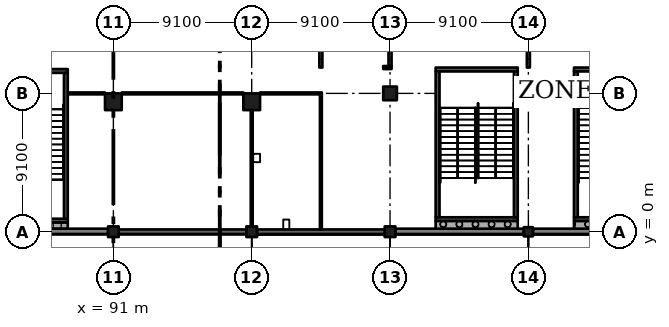
"""IFC4 building model, lengths in metres.
Left out: names, types, materials, properties, quantities, classifications, styles, units other than length and angle.
Written with IfcOpenShell. Run it as: python <this file> out.ifc"""

import sys

from ifc_helpers import new_model, si_unit, direction, frame, frame_2d, origin, origin_2d, place, context, subcontext, project, spatial, rectangle, extrude, element, fill, save


model = new_model("IFC4")
c1 = context("Model", 3, precision=1e-05, world=origin(), true_north=direction((0.0, 1.0)))
c2 = subcontext(c1, "Body", "Model", "MODEL_VIEW")
j1 = project(units=[si_unit("LENGTHUNIT", "METRE"), si_unit("PLANEANGLEUNIT", "RADIAN")], contexts=[c1])
p1 = place(None, origin())
s1 = spatial("IfcSite", under=j1, at=p1, CompositionType="ELEMENT")
p2 = place(p1, origin())
s2 = spatial("IfcBuilding", under=s1, at=p2, CompositionType="ELEMENT")
p3 = place(p2, origin())
s3 = spatial("IfcBuildingStorey", under=s2, at=p3, CompositionType="ELEMENT", Elevation=0.0)
p4 = place(p3, frame((91.0, 0.0, -0.4), z_axis=(0.0, 0.0, 1.0), x_axis=(1.0, 0.0, 0.0)))
e1 = element("IfcColumn", 1, at=p4, inside=s3, PredefinedType="COLUMN", context=c2, shape_type="SweptSolid", body=[
    extrude(rectangle(XDim=0.7, YDim=0.7, at=origin_2d()), origin(), (0.0, 0.0, 1.0), 6.77),
])
p5 = place(p3, frame((91.0, 8.55, -0.4), z_axis=(0.0, 0.0, 1.0), x_axis=(1.0, 0.0, 0.0)))
e2 = element("IfcColumn", 2, at=p5, inside=s3, PredefinedType="COLUMN", context=c2, shape_type="SweptSolid", body=[
    extrude(rectangle(XDim=1.1, YDim=1.1, at=origin_2d()), origin(), (0.0, 0.0, 1.0), 6.77),
])
p6 = place(p3, frame((100.1, 0.0, -0.4), z_axis=(0.0, 0.0, 1.0), x_axis=(1.0, 0.0, 0.0)))
e3 = element("IfcColumn", 3, at=p6, inside=s3, PredefinedType="COLUMN", context=c2, shape_type="SweptSolid", body=[
    extrude(rectangle(XDim=0.7, YDim=0.7, at=origin_2d()), origin(), (0.0, 0.0, 1.0), 6.77),
])
p7 = place(p3, frame((100.1, 8.55, -0.4), z_axis=(0.0, 0.0, 1.0), x_axis=(1.0, 0.0, 0.0)))
e4 = element("IfcColumn", 4, at=p7, inside=s3, PredefinedType="COLUMN", context=c2, shape_type="SweptSolid", body=[
    extrude(rectangle(XDim=1.1, YDim=1.1, at=origin_2d()), origin(), (0.0, 0.0, 1.0), 6.77),
])
p8 = place(p3, frame((109.2, 0.0, -0.4), z_axis=(0.0, 0.0, 1.0), x_axis=(1.0, 0.0, 0.0)))
e5 = element("IfcColumn", 5, at=p8, inside=s3, PredefinedType="COLUMN", context=c2, shape_type="SweptSolid", body=[
    extrude(rectangle(XDim=0.7, YDim=0.7, at=origin_2d()), origin(), (0.0, 0.0, 1.0), 6.77),
])
p9 = place(p3, frame((109.2, 9.1, -0.4), z_axis=(0.0, 0.0, 1.0), x_axis=(1.0, 0.0, 0.0)))
e6 = element("IfcColumn", 6, at=p9, inside=s3, PredefinedType="COLUMN", context=c2, shape_type="SweptSolid", body=[
    extrude(rectangle(XDim=0.9, YDim=0.9, at=origin_2d()), origin(), (0.0, 0.0, 1.0), 6.77),
])
p10 = place(p3, frame((118.3, 0.0, -0.4), z_axis=(0.0, 0.0, 1.0), x_axis=(1.0, 0.0, 0.0)))
e7 = element("IfcColumn", 7, at=p10, inside=s3, PredefinedType="COLUMN", context=c2, shape_type="SweptSolid", body=[
    extrude(rectangle(XDim=0.6, YDim=0.6, at=origin_2d()), origin(), (0.0, 0.0, 1.0), 6.77),
])
p11 = place(p3, frame((118.3, 9.1, -0.4), z_axis=(0.0, 0.0, 1.0), x_axis=(1.0, 0.0, 0.0)))
e8 = element("IfcColumn", 8, at=p11, inside=s3, PredefinedType="COLUMN", context=c2, shape_type="SweptSolid", body=[
    extrude(rectangle(XDim=0.8, YDim=0.8, at=origin_2d()), origin(), (0.0, 0.0, 1.0), 6.77),
])
p12 = place(p3, frame((126.7, 0.825, -0.4), z_axis=(0.0, 0.0, 1.0), x_axis=(-1.0, 0.0, 0.0)))
e9 = element("IfcWall", 9, at=p12, inside=s3, PredefinedType="SHEAR", context=c2, shape_type="SweptSolid", body=[
    extrude(rectangle(XDim=5.4, YDim=0.25, at=frame_2d((2.7, 0.0))), origin(), (0.0, 0.0, 1.0), 6.77),
])
p13 = place(p3, frame((126.7, 10.675, -0.4), z_axis=(0.0, 0.0, 1.0), x_axis=(-1.0, 0.0, 0.0)))
e10 = element("IfcWall", 10, at=p13, inside=s3, PredefinedType="SHEAR", context=c2, shape_type="SweptSolid", body=[
    extrude(rectangle(XDim=5.4, YDim=0.25, at=frame_2d((2.7, 0.0))), origin(), (0.0, 0.0, 1.0), 6.77),
])
p14 = place(p13, frame((1.5, 0.0, 0.4)))
e11 = element("IfcOpeningElement", 11, at=p14, cuts=e10, PredefinedType="OPENING", context=c2, shape_type="SweptSolid", body=[
    extrude(rectangle(XDim=2.4, YDim=2.1, at=frame_2d((1.2, 1.05))), frame((0.0, 0.135, 0.0), z_axis=(0.0, -1.0, 0.0), x_axis=(1.0, 0.0, 0.0)), (0.0, 0.0, 1.0), 0.27),
])
p15 = place(p3, frame((121.425, 10.55, -0.4), z_axis=(0.0, 0.0, 1.0), x_axis=(0.0, -1.0, 0.0)))
e12 = element("IfcWall", 12, at=p15, inside=s3, PredefinedType="SHEAR", context=c2, shape_type="SweptSolid", body=[
    extrude(rectangle(XDim=9.6, YDim=0.25, at=frame_2d((4.8, 0.0))), origin(), (0.0, 0.0, 1.0), 6.77),
])
p16 = place(p15, frame((0.45, 0.0, 0.4)))
e13 = element("IfcOpeningElement", 13, at=p16, cuts=e12, PredefinedType="OPENING", context=c2, shape_type="SweptSolid", body=[
    extrude(rectangle(XDim=1.2, YDim=2.1, at=frame_2d((0.6, 1.05))), frame((0.0, 0.135, 0.0), z_axis=(0.0, -1.0, 0.0), x_axis=(1.0, 0.0, 0.0)), (0.0, 0.0, 1.0), 0.27),
])
p17 = place(p3, frame((117.6, 0.825, -0.4), z_axis=(0.0, 0.0, 1.0), x_axis=(-1.0, 0.0, 0.0)))
e14 = element("IfcWall", 14, at=p17, inside=s3, PredefinedType="SHEAR", context=c2, shape_type="SweptSolid", body=[
    extrude(rectangle(XDim=5.4, YDim=0.25, at=frame_2d((2.7, 0.0))), origin(), (0.0, 0.0, 1.0), 6.77),
])
p18 = place(p3, frame((117.6, 10.675, -0.4), z_axis=(0.0, 0.0, 1.0), x_axis=(-1.0, 0.0, 0.0)))
e15 = element("IfcWall", 15, at=p18, inside=s3, PredefinedType="SHEAR", context=c2, shape_type="SweptSolid", body=[
    extrude(rectangle(XDim=5.4, YDim=0.25, at=frame_2d((2.7, 0.0))), origin(), (0.0, 0.0, 1.0), 6.77),
])
p19 = place(p18, frame((1.5, 0.0, 0.4)))
e16 = element("IfcOpeningElement", 16, at=p19, cuts=e15, PredefinedType="OPENING", context=c2, shape_type="SweptSolid", body=[
    extrude(rectangle(XDim=2.4, YDim=2.1, at=frame_2d((1.2, 1.05))), frame((0.0, 0.135, 0.0), z_axis=(0.0, -1.0, 0.0), x_axis=(1.0, 0.0, 0.0)), (0.0, 0.0, 1.0), 0.27),
])
p20 = place(p3, frame((112.325, 10.55, -0.4), z_axis=(0.0, 0.0, 1.0), x_axis=(0.0, -1.0, 0.0)))
e17 = element("IfcWall", 17, at=p20, inside=s3, PredefinedType="SHEAR", context=c2, shape_type="SweptSolid", body=[
    extrude(rectangle(XDim=9.6, YDim=0.25, at=frame_2d((4.8, 0.0))), origin(), (0.0, 0.0, 1.0), 6.77),
])
p21 = place(p20, frame((0.45, 0.0, 0.4)))
e18 = element("IfcOpeningElement", 18, at=p21, cuts=e17, PredefinedType="OPENING", context=c2, shape_type="SweptSolid", body=[
    extrude(rectangle(XDim=1.2, YDim=2.1, at=frame_2d((0.6, 1.05))), frame((0.0, 0.135, 0.0), z_axis=(0.0, -1.0, 0.0), x_axis=(1.0, 0.0, 0.0)), (0.0, 0.0, 1.0), 0.27),
])
p22 = place(p3, frame((117.475, 10.55, -0.4), z_axis=(0.0, 0.0, 1.0), x_axis=(0.0, -1.0, 0.0)))
e19 = element("IfcWall", 19, at=p22, inside=s3, PredefinedType="SHEAR", context=c2, shape_type="SweptSolid", body=[
    extrude(rectangle(XDim=9.6, YDim=0.25, at=frame_2d((4.8, 0.0))), origin(), (0.0, 0.0, 1.0), 6.77),
])
p23 = place(p3, frame((88.0, 0.725, -0.4), z_axis=(0.0, 0.0, 1.0), x_axis=(-1.0, 0.0, 0.0)))
e20 = element("IfcWall", 20, at=p23, inside=s3, PredefinedType="SHEAR", context=c2, shape_type="SweptSolid", body=[
    extrude(rectangle(XDim=5.4, YDim=0.25, at=frame_2d((2.7, 0.0))), origin(), (0.0, 0.0, 1.0), 6.77),
])
p24 = place(p3, frame((88.0, 10.575, -0.4), z_axis=(0.0, 0.0, 1.0), x_axis=(-1.0, 0.0, 0.0)))
e21 = element("IfcWall", 21, at=p24, inside=s3, PredefinedType="SHEAR", context=c2, shape_type="SweptSolid", body=[
    extrude(rectangle(XDim=5.4, YDim=0.25, at=frame_2d((2.7, 0.0))), origin(), (0.0, 0.0, 1.0), 6.77),
])
p25 = place(p24, frame((1.5, 0.0, 0.4)))
e22 = element("IfcOpeningElement", 22, at=p25, cuts=e21, PredefinedType="OPENING", context=c2, shape_type="SweptSolid", body=[
    extrude(rectangle(XDim=2.4, YDim=2.1, at=frame_2d((1.2, 1.05))), frame((0.0, 0.135, 0.0), z_axis=(0.0, -1.0, 0.0), x_axis=(1.0, 0.0, 0.0)), (0.0, 0.0, 1.0), 0.27),
])
p26 = place(p3, frame((87.875, 10.45, -0.4), z_axis=(0.0, 0.0, 1.0), x_axis=(0.0, -1.0, 0.0)))
e23 = element("IfcWall", 23, at=p26, inside=s3, PredefinedType="SHEAR", context=c2, shape_type="SweptSolid", body=[
    extrude(rectangle(XDim=9.6, YDim=0.25, at=frame_2d((4.8, 0.0))), origin(), (0.0, 0.0, 1.0), 6.77),
])
p27 = place(p3, frame((82.225, 0.025, 0.0), z_axis=(0.0, 0.0, 1.0), x_axis=(1.0, 0.0, 0.0)))
e24 = element("IfcWall", 24, at=p27, inside=s3, PredefinedType="SOLIDWALL", context=c2, shape_type="SweptSolid", body=[
    extrude(rectangle(XDim=8.425, YDim=0.35, at=frame_2d((4.212, 0.0))), origin(), (0.0, 0.0, 1.0), 5.27),
])
p28 = place(p3, frame((91.35, 0.0, 0.0), z_axis=(0.0, 0.0, 1.0), x_axis=(1.0, 0.0, 0.0)))
e25 = element("IfcWall", 25, at=p28, inside=s3, PredefinedType="SOLIDWALL", context=c2, shape_type="SweptSolid", body=[
    extrude(rectangle(XDim=8.4, YDim=0.3, at=frame_2d((4.2, 0.0))), origin(), (0.0, 0.0, 1.0), 5.32),
])
p29 = place(p3, frame((100.45, 0.0, 0.0), z_axis=(0.0, 0.0, 1.0), x_axis=(1.0, 0.0, 0.0)))
e26 = element("IfcWall", 26, at=p29, inside=s3, PredefinedType="SOLIDWALL", context=c2, shape_type="SweptSolid", body=[
    extrude(rectangle(XDim=8.4, YDim=0.3, at=frame_2d((4.2, 0.0))), origin(), (0.0, 0.0, 1.0), 5.32),
])
p30 = place(p29, frame((4.675, 0.0, 0.0)))
e27 = element("IfcOpeningElement", 27, at=p30, cuts=e26, PredefinedType="OPENING", context=c2, shape_type="SweptSolid", body=[
    extrude(rectangle(XDim=3.0, YDim=2.4, at=frame_2d((1.5, 1.2))), frame((0.0, 0.16, 0.0), z_axis=(0.0, -1.0, 0.0), x_axis=(1.0, 0.0, 0.0)), (0.0, 0.0, 1.0), 0.32),
])
p31 = place(p3, frame((109.55, 0.025, 0.0), z_axis=(0.0, 0.0, 1.0), x_axis=(1.0, 0.0, 0.0)))
e28 = element("IfcWall", 28, at=p31, inside=s3, PredefinedType="SOLIDWALL", context=c2, shape_type="SweptSolid", body=[
    extrude(rectangle(XDim=8.45, YDim=0.35, at=frame_2d((4.225, 0.0))), origin(), (0.0, 0.0, 1.0), 5.27),
])
p32 = place(p31, frame((0.4, 0.0, 0.0)))
e29 = element("IfcOpeningElement", 29, at=p32, cuts=e28, PredefinedType="OPENING", context=c2, shape_type="SweptSolid", body=[
    extrude(rectangle(XDim=2.1, YDim=2.4, at=frame_2d((1.05, 1.2))), frame((0.0, 0.185, 0.0), z_axis=(0.0, -1.0, 0.0), x_axis=(1.0, 0.0, 0.0)), (0.0, 0.0, 1.0), 0.37),
])
p33 = place(p3, frame((118.6, 0.025, 0.0), z_axis=(0.0, 0.0, 1.0), x_axis=(1.0, 0.0, 0.0)))
e30 = element("IfcWall", 30, at=p33, inside=s3, PredefinedType="SOLIDWALL", context=c2, shape_type="SweptSolid", body=[
    extrude(rectangle(XDim=8.5, YDim=0.35, at=frame_2d((4.25, 0.0))), origin(), (0.0, 0.0, 1.0), 5.27),
])
p34 = place(p33, frame((0.45, 0.0, 0.0)))
e31 = element("IfcOpeningElement", 31, at=p34, cuts=e30, PredefinedType="OPENING", context=c2, shape_type="SweptSolid", body=[
    extrude(rectangle(XDim=2.1, YDim=2.4, at=frame_2d((1.05, 1.2))), frame((0.0, 0.185, 0.0), z_axis=(0.0, -1.0, 0.0), x_axis=(1.0, 0.0, 0.0)), (0.0, 0.0, 1.0), 0.37),
])
p35 = place(p3, frame((121.3, 0.45, 0.0), z_axis=(0.0, 0.0, 1.0), x_axis=(1.0, 0.0, 0.0)))
e32 = element("IfcWall", 32, at=p35, inside=s3, PredefinedType="SOLIDWALL", context=c2, shape_type="SweptSolid", body=[
    extrude(rectangle(XDim=5.4, YDim=0.5, at=frame_2d((2.7, 0.0))), origin(), (0.0, 0.0, 1.0), 6.37),
])
p36 = place(p3, frame((112.2, 0.45, 0.0), z_axis=(0.0, 0.0, 1.0), x_axis=(1.0, 0.0, 0.0)))
e33 = element("IfcWall", 33, at=p36, inside=s3, PredefinedType="SOLIDWALL", context=c2, shape_type="SweptSolid", body=[
    extrude(rectangle(XDim=5.4, YDim=0.5, at=frame_2d((2.7, 0.0))), origin(), (0.0, 0.0, 1.0), 6.37),
])
p37 = place(p3, frame((82.6, 0.4, 0.0), z_axis=(0.0, 0.0, 1.0), x_axis=(1.0, 0.0, 0.0)))
e34 = element("IfcWall", 34, at=p37, inside=s3, PredefinedType="SOLIDWALL", context=c2, shape_type="SweptSolid", body=[
    extrude(rectangle(XDim=5.4, YDim=0.4, at=frame_2d((2.7, 0.0))), origin(), (0.0, 0.0, 1.0), 6.02),
])
p38 = place(p3, frame((90.45, 9.1, 0.0), z_axis=(0.0, 0.0, 1.0), x_axis=(-1.0, 0.0, 0.0)))
e35 = element("IfcWall", 35, at=p38, inside=s3, PredefinedType="PARTITIONING", context=c2, shape_type="SweptSolid", body=[
    extrude(rectangle(XDim=2.42, YDim=0.125, at=frame_2d((1.21, 0.0))), origin(), (0.0, 0.0, 1.0), 5.57),
])
p39 = place(p3, frame((99.55, 9.1, 0.0), z_axis=(0.0, 0.0, 1.0), x_axis=(-1.0, 0.0, 0.0)))
e36 = element("IfcWall", 36, at=p39, inside=s3, PredefinedType="PARTITIONING", context=c2, shape_type="SweptSolid", body=[
    extrude(rectangle(XDim=8.0, YDim=0.125, at=frame_2d((4.0, 0.0))), origin(), (0.0, 0.0, 1.0), 5.32),
])
p40 = place(p39, frame((3.55, 0.0, 0.0)))
e37 = element("IfcOpeningElement", 37, at=p40, cuts=e36, PredefinedType="OPENING", context=c2, shape_type="SweptSolid", body=[
    extrude(rectangle(XDim=0.9, YDim=2.1, at=frame_2d((0.45, 1.05))), frame((0.0, 0.073, 0.0), z_axis=(0.0, -1.0, 0.0), x_axis=(1.0, 0.0, 0.0)), (0.0, 0.0, 1.0), 0.145),
])
p41 = place(p3, frame((100.1, 8.0, 0.0), z_axis=(0.0, 0.0, 1.0), x_axis=(0.0, -1.0, 0.0)))
e38 = element("IfcWall", 38, at=p41, inside=s3, PredefinedType="PARTITIONING", context=c2, shape_type="SweptSolid", body=[
    extrude(rectangle(XDim=7.65, YDim=0.125, at=frame_2d((3.825, 0.0))), origin(), (0.0, 0.0, 1.0), 5.37),
])
p42 = place(p3, frame((104.65, 0.15, 0.0), z_axis=(0.0, 0.0, 1.0), x_axis=(0.0, 1.0, 0.0)))
e39 = element("IfcWall", 39, at=p42, inside=s3, PredefinedType="PARTITIONING", context=c2, shape_type="SweptSolid", body=[
    extrude(rectangle(XDim=8.888, YDim=0.125, at=frame_2d((4.444, 0.0))), origin(), (0.0, 0.0, 1.0), 6.02),
])
p43 = place(p3, frame((104.65, 10.8, 0.0), z_axis=(0.0, 0.0, 1.0), x_axis=(0.0, 1.0, 0.0)))
e40 = element("IfcWall", 40, at=p43, inside=s3, PredefinedType="PARTITIONING", context=c2, shape_type="SweptSolid", body=[
    extrude(rectangle(XDim=7.3, YDim=0.2, at=frame_2d((3.65, 0.0))), origin(), (0.0, 0.0, 1.0), 6.02),
])
p44 = place(p43, frame((0.95, 0.0, 0.0)))
e41 = element("IfcOpeningElement", 41, at=p44, cuts=e40, PredefinedType="OPENING", context=c2, shape_type="SweptSolid", body=[
    extrude(rectangle(XDim=1.8, YDim=2.4, at=frame_2d((0.9, 1.2))), frame((0.0, 0.11, 0.0), z_axis=(0.0, -1.0, 0.0), x_axis=(1.0, 0.0, 0.0)), (0.0, 0.0, 1.0), 0.22),
])
p45 = place(p43, frame((4.55, 0.0, 0.0)))
e42 = element("IfcOpeningElement", 42, at=p45, cuts=e40, PredefinedType="OPENING", context=c2, shape_type="SweptSolid", body=[
    extrude(rectangle(XDim=1.8, YDim=2.4, at=frame_2d((0.9, 1.2))), frame((0.0, 0.11, 0.0), z_axis=(0.0, -1.0, 0.0), x_axis=(1.0, 0.0, 0.0)), (0.0, 0.0, 1.0), 0.22),
])
p46 = place(p3, frame((104.712, 9.1, 0.0), z_axis=(0.0, 0.0, 1.0), x_axis=(-1.0, 0.0, 0.0)))
e43 = element("IfcWall", 43, at=p46, inside=s3, PredefinedType="PARTITIONING", context=c2, shape_type="SweptSolid", body=[
    extrude(rectangle(XDim=4.062, YDim=0.125, at=frame_2d((2.031, 0.0))), origin(), (0.0, 0.0, 1.0), 5.32),
])
p47 = place(p46, frame((1.55, 0.0, 0.0)))
e44 = element("IfcOpeningElement", 44, at=p47, cuts=e43, PredefinedType="OPENING", context=c2, shape_type="SweptSolid", body=[
    extrude(rectangle(XDim=1.0, YDim=2.1, at=frame_2d((0.5, 1.05))), frame((0.0, 0.073, 0.0), z_axis=(0.0, -1.0, 0.0), x_axis=(1.0, 0.0, 0.0)), (0.0, 0.0, 1.0), 0.145),
])
p48 = place(p3, frame((108.75, 10.8, 0.0), z_axis=(0.0, 0.0, 1.0), x_axis=(1.0, 0.0, 0.0)))
e45 = element("IfcWall", 45, at=p48, inside=s3, PredefinedType="PARTITIONING", context=c2, shape_type="SweptSolid", body=[
    extrude(rectangle(XDim=0.55, YDim=0.2, at=frame_2d((0.275, 0.0))), origin(), (0.0, 0.0, 1.0), 6.02),
])
p49 = place(p3, frame((109.2, 10.9, 0.0), z_axis=(0.0, 0.0, 1.0), x_axis=(0.0, 1.0, 0.0)))
e46 = element("IfcWall", 46, at=p49, inside=s3, PredefinedType="PARTITIONING", context=c2, shape_type="SweptSolid", body=[
    extrude(rectangle(XDim=6.825, YDim=0.2, at=frame_2d((3.413, 0.0))), origin(), (0.0, 0.0, 1.0), 5.32),
])
p50 = place(p49, frame((0.85, 0.0, 0.0)))
e47 = element("IfcOpeningElement", 47, at=p50, cuts=e46, PredefinedType="OPENING", context=c2, shape_type="SweptSolid", body=[
    extrude(rectangle(XDim=1.8, YDim=2.4, at=frame_2d((0.9, 1.2))), frame((0.0, 0.11, 0.0), z_axis=(0.0, -1.0, 0.0), x_axis=(1.0, 0.0, 0.0)), (0.0, 0.0, 1.0), 0.22),
])
p51 = place(p49, frame((4.25, 0.0, 0.0)))
e48 = element("IfcOpeningElement", 48, at=p51, cuts=e46, PredefinedType="OPENING", context=c2, shape_type="SweptSolid", body=[
    extrude(rectangle(XDim=1.8, YDim=2.4, at=frame_2d((0.9, 1.2))), frame((0.0, 0.11, 0.0), z_axis=(0.0, -1.0, 0.0), x_axis=(1.0, 0.0, 0.0)), (0.0, 0.0, 1.0), 0.22),
])
p52 = place(p3, frame((118.3, 10.8, 0.0), z_axis=(0.0, 0.0, 1.0), x_axis=(0.0, 1.0, 0.0)))
e49 = element("IfcWall", 49, at=p52, inside=s3, PredefinedType="PARTITIONING", context=c2, shape_type="SweptSolid", body=[
    extrude(rectangle(XDim=6.925, YDim=0.2, at=frame_2d((3.462, 0.0))), origin(), (0.0, 0.0, 1.0), 5.32),
])
p53 = place(p52, frame((0.85, 0.0, 0.0)))
e50 = element("IfcOpeningElement", 50, at=p53, cuts=e49, PredefinedType="OPENING", context=c2, shape_type="SweptSolid", body=[
    extrude(rectangle(XDim=1.8, YDim=2.4, at=frame_2d((0.9, 1.2))), frame((0.0, 0.11, 0.0), z_axis=(0.0, -1.0, 0.0), x_axis=(1.0, 0.0, 0.0)), (0.0, 0.0, 1.0), 0.22),
])
p54 = place(p52, frame((4.25, 0.0, 0.0)))
e51 = element("IfcOpeningElement", 51, at=p54, cuts=e49, PredefinedType="OPENING", context=c2, shape_type="SweptSolid", body=[
    extrude(rectangle(XDim=1.8, YDim=2.4, at=frame_2d((0.9, 1.2))), frame((0.0, 0.11, 0.0), z_axis=(0.0, -1.0, 0.0), x_axis=(1.0, 0.0, 0.0)), (0.0, 0.0, 1.0), 0.22),
])
p55 = place(p30, frame((3.0, 0.0, 0.0), z_axis=(0.0, 0.0, 1.0), x_axis=(-1.0, 0.0, 0.0)))
e52 = element("IfcDoor", 52, at=p55, inside=s3, OperationType="DOUBLE_DOOR_SINGLE_SWING", PredefinedType="DOOR", context=c2, shape_type="SweptSolid", body=[
    extrude(rectangle(XDim=3.0, YDim=2.4, at=frame_2d((1.5, 1.2))), frame((0.0, 0.025, 0.0), z_axis=(0.0, -1.0, 0.0), x_axis=(1.0, 0.0, 0.0)), (0.0, 0.0, 1.0), 0.05),
])
fill(e27, e52)
p56 = place(p32, frame((2.1, 0.0, 0.0), z_axis=(0.0, 0.0, 1.0), x_axis=(-1.0, 0.0, 0.0)))
e53 = element("IfcDoor", 53, at=p56, inside=s3, OperationType="DOUBLE_DOOR_SINGLE_SWING", PredefinedType="DOOR", context=c2, shape_type="SweptSolid", body=[
    extrude(rectangle(XDim=2.1, YDim=2.4, at=frame_2d((1.05, 1.2))), frame((0.0, 0.025, 0.0), z_axis=(0.0, -1.0, 0.0), x_axis=(1.0, 0.0, 0.0)), (0.0, 0.0, 1.0), 0.05),
])
fill(e29, e53)
p57 = place(p34, frame((2.1, 0.0, 0.0), z_axis=(0.0, 0.0, 1.0), x_axis=(-1.0, 0.0, 0.0)))
e54 = element("IfcDoor", 54, at=p57, inside=s3, OperationType="DOUBLE_DOOR_SINGLE_SWING", PredefinedType="DOOR", context=c2, shape_type="SweptSolid", body=[
    extrude(rectangle(XDim=2.1, YDim=2.4, at=frame_2d((1.05, 1.2))), frame((0.0, 0.025, 0.0), z_axis=(0.0, -1.0, 0.0), x_axis=(1.0, 0.0, 0.0)), (0.0, 0.0, 1.0), 0.05),
])
fill(e31, e54)
p58 = place(p40, origin())
e55 = element("IfcDoor", 55, at=p58, inside=s3, OperationType="SINGLE_SWING_RIGHT", PredefinedType="DOOR", context=c2, shape_type="SweptSolid", body=[
    extrude(rectangle(XDim=0.9, YDim=2.1, at=frame_2d((0.45, 1.05))), frame((0.0, 0.025, 0.0), z_axis=(0.0, -1.0, 0.0), x_axis=(1.0, 0.0, 0.0)), (0.0, 0.0, 1.0), 0.05),
])
fill(e37, e55)
p59 = place(p47, origin())
e56 = element("IfcDoor", 56, at=p59, inside=s3, OperationType="SINGLE_SWING_LEFT", PredefinedType="DOOR", context=c2, shape_type="SweptSolid", body=[
    extrude(rectangle(XDim=1.0, YDim=2.1, at=frame_2d((0.5, 1.05))), frame((0.0, 0.025, 0.0), z_axis=(0.0, -1.0, 0.0), x_axis=(1.0, 0.0, 0.0)), (0.0, 0.0, 1.0), 0.05),
])
fill(e44, e56)
p60 = place(p53, origin())
e57 = element("IfcDoor", 57, at=p60, inside=s3, OperationType="DOUBLE_DOOR_SINGLE_SWING", PredefinedType="DOOR", context=c2, shape_type="SweptSolid", body=[
    extrude(rectangle(XDim=1.8, YDim=2.4, at=frame_2d((0.9, 1.2))), frame((0.0, 0.025, 0.0), z_axis=(0.0, -1.0, 0.0), x_axis=(1.0, 0.0, 0.0)), (0.0, 0.0, 1.0), 0.05),
])
fill(e50, e57)
p61 = place(p50, origin())
e58 = element("IfcDoor", 58, at=p61, inside=s3, OperationType="DOUBLE_DOOR_SINGLE_SWING", PredefinedType="DOOR", context=c2, shape_type="SweptSolid", body=[
    extrude(rectangle(XDim=1.8, YDim=2.4, at=frame_2d((0.9, 1.2))), frame((0.0, 0.025, 0.0), z_axis=(0.0, -1.0, 0.0), x_axis=(1.0, 0.0, 0.0)), (0.0, 0.0, 1.0), 0.05),
])
fill(e47, e58)
p62 = place(p44, origin())
e59 = element("IfcDoor", 59, at=p62, inside=s3, OperationType="DOUBLE_DOOR_SINGLE_SWING", PredefinedType="DOOR", context=c2, shape_type="SweptSolid", body=[
    extrude(rectangle(XDim=1.8, YDim=2.4, at=frame_2d((0.9, 1.2))), frame((0.0, 0.025, 0.0), z_axis=(0.0, -1.0, 0.0), x_axis=(1.0, 0.0, 0.0)), (0.0, 0.0, 1.0), 0.05),
])
fill(e41, e59)
p63 = place(p19, origin())
e60 = element("IfcDoor", 60, at=p63, inside=s3, OperationType="DOUBLE_DOOR_SINGLE_SWING", PredefinedType="DOOR", context=c2, shape_type="SweptSolid", body=[
    extrude(rectangle(XDim=2.4, YDim=2.1, at=frame_2d((1.2, 1.05))), frame((0.0, 0.025, 0.0), z_axis=(0.0, -1.0, 0.0), x_axis=(1.0, 0.0, 0.0)), (0.0, 0.0, 1.0), 0.05),
])
fill(e16, e60)
p64 = place(p16, origin())
e61 = element("IfcDoor", 61, at=p64, inside=s3, OperationType="SINGLE_SWING_LEFT", PredefinedType="DOOR", context=c2, shape_type="SweptSolid", body=[
    extrude(rectangle(XDim=1.2, YDim=2.1, at=frame_2d((0.6, 1.05))), frame((0.0, 0.025, 0.0), z_axis=(0.0, -1.0, 0.0), x_axis=(1.0, 0.0, 0.0)), (0.0, 0.0, 1.0), 0.05),
])
fill(e13, e61)
p65 = place(p21, origin())
e62 = element("IfcDoor", 62, at=p65, inside=s3, OperationType="SINGLE_SWING_LEFT", PredefinedType="DOOR", context=c2, shape_type="SweptSolid", body=[
    extrude(rectangle(XDim=1.2, YDim=2.1, at=frame_2d((0.6, 1.05))), frame((0.0, 0.025, 0.0), z_axis=(0.0, -1.0, 0.0), x_axis=(1.0, 0.0, 0.0)), (0.0, 0.0, 1.0), 0.05),
])
fill(e18, e62)
save(model, sys.argv[1])
